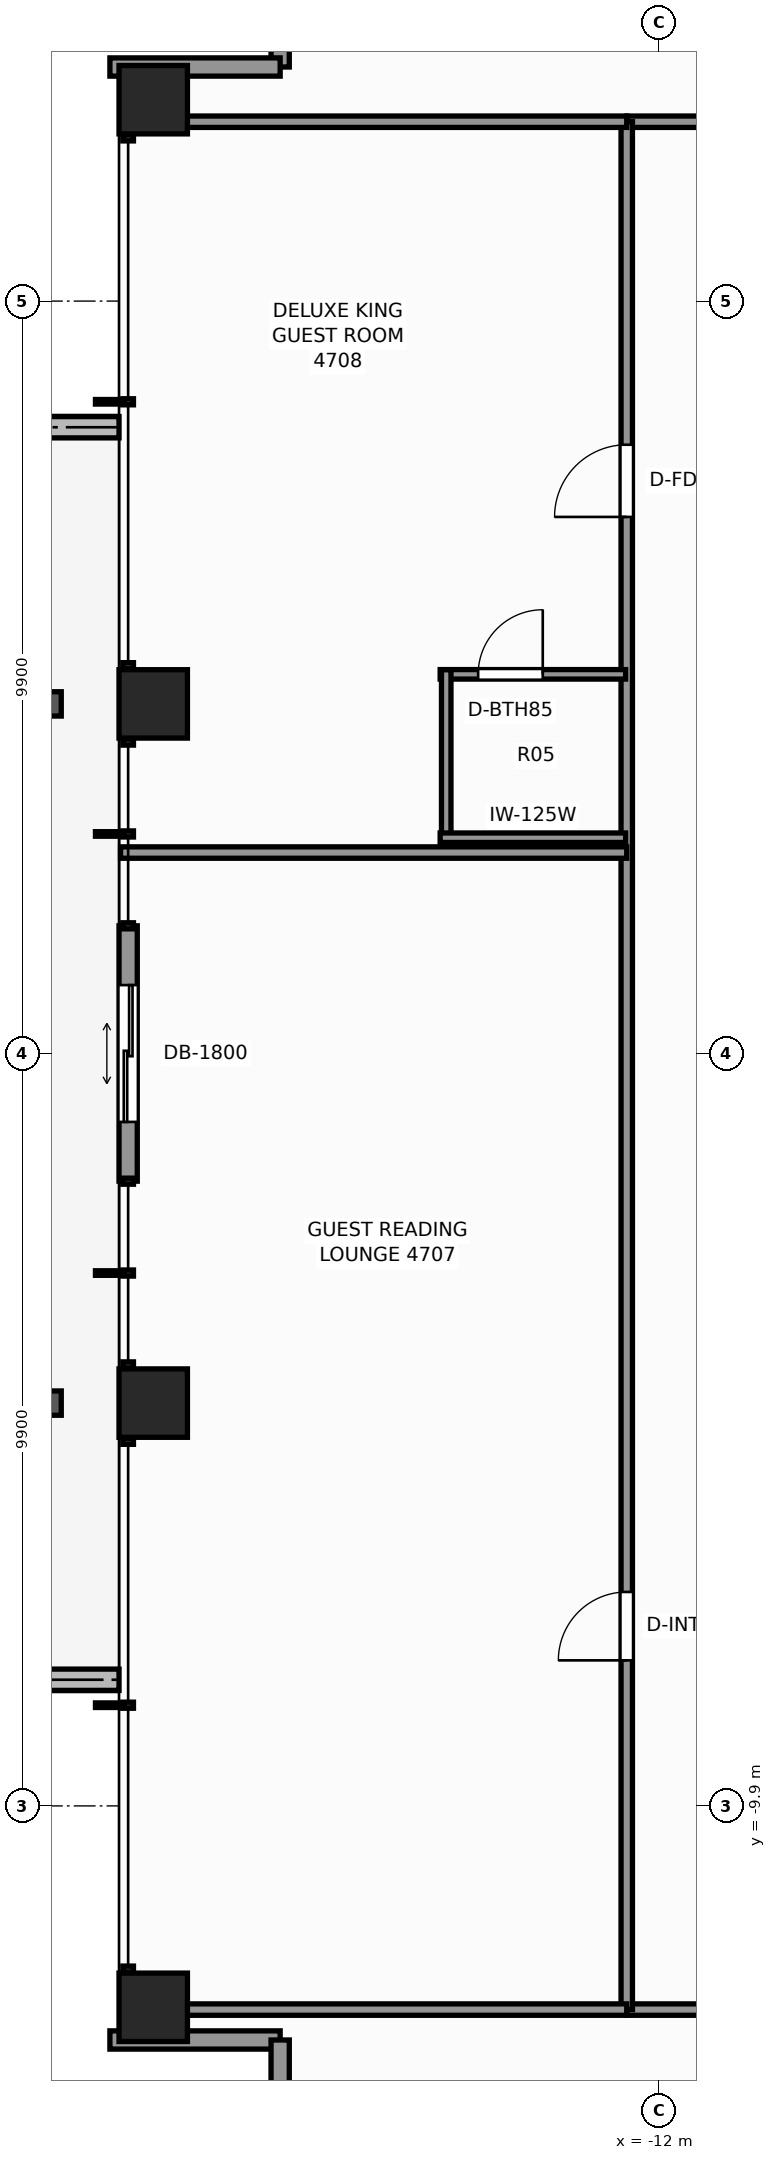
"""IFC4 building model, lengths in metres.
Left out: names, types, materials, properties, quantities, classifications, styles, units other than length and angle.
Written with IfcOpenShell. Run it as: python <this file> out.ifc"""

import sys

from ifc_helpers import new_model, si_unit, direction, frame, frame_2d, origin, origin_2d, place, context, subcontext, project, spatial, rectangle, extrude, element, fill, save


model = new_model("IFC4")
c1 = context("Model", 3, precision=1e-05, world=origin(), true_north=direction((0.0, 1.0)))
c2 = subcontext(c1, "Body", "Model", "MODEL_VIEW")
j1 = project(units=[si_unit("LENGTHUNIT", "METRE"), si_unit("PLANEANGLEUNIT", "RADIAN")], contexts=[c1])
p1 = place(None, origin())
s1 = spatial("IfcSite", under=j1, at=p1, CompositionType="ELEMENT")
p2 = place(p1, origin())
s2 = spatial("IfcBuilding", under=s1, at=p2, CompositionType="ELEMENT")
p3 = place(p2, frame((0.0, 0.0, 163.5)))
s3 = spatial("IfcBuildingStorey", under=s2, at=p3, CompositionType="ELEMENT", Elevation=163.5)
for number, where, z_axis, x_axis in (
    (1, (-18.65, -12.55, 0.0), (0.0, 0.0, 1.0), (1.0, 0.0, 0.0)),
    (2, (-18.65, -4.6, 0.0), (0.0, 0.0, 1.0), (1.0, 0.0, 0.0)),
    (3, (-18.65, 4.6, 0.0), (0.0, 0.0, 1.0), (1.0, 0.0, 0.0)),
    (4, (-18.65, 12.55, 0.0), (0.0, 0.0, 1.0), (1.0, 0.0, 0.0)),
):
    element("IfcColumn", number, at=place(p3, frame(where, z_axis=z_axis, x_axis=x_axis)), inside=s3, PredefinedType="COLUMN", context=c2, shape_type="SweptSolid", body=[
        extrude(rectangle(XDim=0.9, YDim=0.9, at=origin_2d()), origin(), (0.0, 0.0, 1.0), 3.3),
    ])
p4 = place(p3, frame((-22.314, -8.24, -0.02), z_axis=(0.0, 0.0, 1.0), x_axis=(1.0, 0.0, 0.0)))
e5 = element("IfcWall", 5, at=p4, inside=s3, PredefinedType="PARAPET", context=c2, shape_type="SweptSolid", body=[
    extrude(rectangle(XDim=3.214, YDim=0.28, at=frame_2d((1.607, 0.0))), origin(), (0.0, 0.0, 1.0), 0.42),
])
p5 = place(p3, frame((-19.1, 8.24, -0.02), z_axis=(0.0, 0.0, 1.0), x_axis=(-1.0, 0.0, 0.0)))
e6 = element("IfcWall", 6, at=p5, inside=s3, PredefinedType="PARAPET", context=c2, shape_type="SweptSolid", body=[
    extrude(rectangle(XDim=2.006, YDim=0.28, at=frame_2d((1.003, 0.0))), origin(), (0.0, 0.0, 1.0), 0.42),
])
p6 = place(p3, frame((-16.98, 12.98, 0.0), z_axis=(0.0, 0.0, 1.0), x_axis=(0.0, 1.0, 0.0)))
e7 = element("IfcWall", 7, at=p6, inside=s3, PredefinedType="STANDARD", context=c2, shape_type="SweptSolid", body=[
    extrude(rectangle(XDim=2.24, YDim=0.24, at=frame_2d((1.12, 0.0))), origin(), (0.0, 0.0, 1.0), 2.483),
])
p7 = place(p6, frame((0.45, 0.0, 0.65)))
e8 = element("IfcOpeningElement", 8, at=p7, cuts=e7, PredefinedType="OPENING", context=c2, shape_type="SweptSolid", body=[
    extrude(rectangle(XDim=1.1, YDim=1.45, at=frame_2d((0.55, 0.725))), frame((0.0, 0.13, 0.0), z_axis=(0.0, -1.0, 0.0), x_axis=(1.0, 0.0, 0.0)), (0.0, 0.0, 1.0), 0.26),
])
p8 = place(p3, frame((-19.22, 12.98, 0.0), z_axis=(0.0, 0.0, 1.0), x_axis=(1.0, 0.0, 0.0)))
e9 = element("IfcWall", 9, at=p8, inside=s3, PredefinedType="STANDARD", context=c2, shape_type="SweptSolid", body=[
    extrude(rectangle(XDim=2.24, YDim=0.24, at=frame_2d((1.12, 0.0))), origin(), (0.0, 0.0, 1.0), 2.483),
])
p9 = place(p3, frame((-18.98, -1.68, 0.0), z_axis=(0.0, 0.0, 1.0), x_axis=(0.0, 1.0, 0.0)))
e10 = element("IfcWall", 10, at=p9, inside=s3, PredefinedType="STANDARD", context=c2, shape_type="SweptSolid", body=[
    extrude(rectangle(XDim=3.36, YDim=0.24, at=frame_2d((1.68, 0.0))), origin(), (0.0, 0.0, 1.0), 3.1),
])
p10 = place(p9, frame((0.78, 0.0, 0.0)))
e11 = element("IfcOpeningElement", 11, at=p10, cuts=e10, PredefinedType="OPENING", context=c2, shape_type="SweptSolid", body=[
    extrude(rectangle(XDim=1.8, YDim=2.2, at=frame_2d((0.9, 1.1))), frame((0.0, 0.13, 0.0), z_axis=(0.0, -1.0, 0.0), x_axis=(1.0, 0.0, 0.0)), (0.0, 0.0, 1.0), 0.26),
])
p11 = place(p3, frame((-16.98, -12.98, 0.0), z_axis=(0.0, 0.0, 1.0), x_axis=(-1.0, 0.0, 0.0)))
e12 = element("IfcWall", 12, at=p11, inside=s3, PredefinedType="STANDARD", context=c2, shape_type="SweptSolid", body=[
    extrude(rectangle(XDim=2.24, YDim=0.24, at=frame_2d((1.12, 0.0))), origin(), (0.0, 0.0, 1.0), 2.483),
])
p12 = place(p3, frame((-16.98, -15.22, 0.0), z_axis=(0.0, 0.0, 1.0), x_axis=(0.0, 1.0, 0.0)))
e13 = element("IfcWall", 13, at=p12, inside=s3, PredefinedType="STANDARD", context=c2, shape_type="SweptSolid", body=[
    extrude(rectangle(XDim=2.24, YDim=0.24, at=frame_2d((1.12, 0.0))), origin(), (0.0, 0.0, 1.0), 2.483),
])
p13 = place(p12, frame((0.45, 0.0, 0.65)))
e14 = element("IfcOpeningElement", 14, at=p13, cuts=e13, PredefinedType="OPENING", context=c2, shape_type="SweptSolid", body=[
    extrude(rectangle(XDim=1.1, YDim=1.45, at=frame_2d((0.55, 0.725))), frame((0.0, 0.13, 0.0), z_axis=(0.0, -1.0, 0.0), x_axis=(1.0, 0.0, 0.0)), (0.0, 0.0, 1.0), 0.26),
])
p14 = place(p3, frame((-12.42, -12.58, 0.0), z_axis=(0.0, 0.0, 1.0), x_axis=(1.0, 0.0, 0.0)))
e15 = element("IfcWall", 15, at=p14, inside=s3, PredefinedType="PARTITIONING", context=c2, shape_type="SweptSolid", body=[
    extrude(rectangle(XDim=24.84, YDim=0.15, at=frame_2d((12.42, 0.0))), origin(), (0.0, 0.0, 1.0), 2.389),
])
p15 = place(p14, frame((4.435, 0.0, 0.0)))
e16 = element("IfcOpeningElement", 16, at=p15, cuts=e15, PredefinedType="OPENING", context=c2, shape_type="SweptSolid", body=[
    extrude(rectangle(XDim=0.9, YDim=2.06, at=frame_2d((0.45, 1.03))), frame((0.0, 0.085, 0.0), z_axis=(0.0, -1.0, 0.0), x_axis=(1.0, 0.0, 0.0)), (0.0, 0.0, 1.0), 0.17),
])
p16 = place(p14, frame((19.505, 0.0, 0.0)))
e17 = element("IfcOpeningElement", 17, at=p16, cuts=e15, PredefinedType="OPENING", context=c2, shape_type="SweptSolid", body=[
    extrude(rectangle(XDim=0.9, YDim=2.06, at=frame_2d((0.45, 1.03))), frame((0.0, 0.085, 0.0), z_axis=(0.0, -1.0, 0.0), x_axis=(1.0, 0.0, 0.0)), (0.0, 0.0, 1.0), 0.17),
])
p17 = place(p3, frame((-12.42, 12.26, 0.0), z_axis=(0.0, 0.0, 1.0), x_axis=(1.0, 0.0, 0.0)))
e18 = element("IfcWall", 18, at=p17, inside=s3, PredefinedType="PARTITIONING", context=c2, shape_type="SweptSolid", body=[
    extrude(rectangle(XDim=24.84, YDim=0.15, at=frame_2d((12.42, 0.0))), origin(), (0.0, 0.0, 1.0), 2.389),
])
p18 = place(p17, frame((3.541, 0.0, 0.0)))
e19 = element("IfcOpeningElement", 19, at=p18, cuts=e18, PredefinedType="OPENING", context=c2, shape_type="SweptSolid", body=[
    extrude(rectangle(XDim=0.95, YDim=2.06, at=frame_2d((0.475, 1.03))), frame((0.0, 0.085, 0.0), z_axis=(0.0, -1.0, 0.0), x_axis=(1.0, 0.0, 0.0)), (0.0, 0.0, 1.0), 0.17),
])
p19 = place(p17, frame((13.975, 0.0, 0.0)))
e20 = element("IfcOpeningElement", 20, at=p19, cuts=e18, PredefinedType="OPENING", context=c2, shape_type="SweptSolid", body=[
    extrude(rectangle(XDim=0.95, YDim=2.06, at=frame_2d((0.475, 1.03))), frame((0.0, 0.085, 0.0), z_axis=(0.0, -1.0, 0.0), x_axis=(1.0, 0.0, 0.0)), (0.0, 0.0, 1.0), 0.17),
])
p20 = place(p17, frame((20.05, 0.0, 0.0)))
e21 = element("IfcOpeningElement", 21, at=p20, cuts=e18, PredefinedType="OPENING", context=c2, shape_type="SweptSolid", body=[
    extrude(rectangle(XDim=0.95, YDim=2.06, at=frame_2d((0.475, 1.03))), frame((0.0, 0.085, 0.0), z_axis=(0.0, -1.0, 0.0), x_axis=(1.0, 0.0, 0.0)), (0.0, 0.0, 1.0), 0.17),
])
p21 = place(p3, frame((-12.42, -12.58, 0.0), z_axis=(0.0, 0.0, 1.0), x_axis=(0.0, 1.0, 0.0)))
e22 = element("IfcWall", 22, at=p21, inside=s3, PredefinedType="PARTITIONING", context=c2, shape_type="SweptSolid", body=[
    extrude(rectangle(XDim=24.84, YDim=0.15, at=frame_2d((12.42, 0.0))), origin(), (0.0, 0.0, 1.0), 2.389),
])
p22 = place(p21, frame((4.595, 0.0, 0.0)))
e23 = element("IfcOpeningElement", 23, at=p22, cuts=e22, PredefinedType="OPENING", context=c2, shape_type="SweptSolid", body=[
    extrude(rectangle(XDim=0.9, YDim=2.06, at=frame_2d((0.45, 1.03))), frame((0.0, 0.085, 0.0), z_axis=(0.0, -1.0, 0.0), x_axis=(1.0, 0.0, 0.0)), (0.0, 0.0, 1.0), 0.17),
])
p23 = place(p21, frame((19.64, 0.0, 0.0)))
e24 = element("IfcOpeningElement", 24, at=p23, cuts=e22, PredefinedType="OPENING", context=c2, shape_type="SweptSolid", body=[
    extrude(rectangle(XDim=0.95, YDim=2.06, at=frame_2d((0.475, 1.03))), frame((0.0, 0.085, 0.0), z_axis=(0.0, -1.0, 0.0), x_axis=(1.0, 0.0, 0.0)), (0.0, 0.0, 1.0), 0.17),
])
for number, where, z_axis, x_axis in (
    (25, (-19.08, -12.58, 0.0), (0.0, 0.0, 1.0), (1.0, 0.0, 0.0)),
    (26, (-19.08, 12.26, 0.0), (0.0, 0.0, 1.0), (1.0, 0.0, 0.0)),
):
    element("IfcWall", number, at=place(p3, frame(where, z_axis=z_axis, x_axis=x_axis)), inside=s3, PredefinedType="PARTITIONING", context=c2, shape_type="SweptSolid", body=[
        extrude(rectangle(XDim=6.66, YDim=0.15, at=frame_2d((3.33, 0.0))), origin(), (0.0, 0.0, 1.0), 2.389),
    ])
p24 = place(p3, frame((-19.08, 2.644, 0.0), z_axis=(0.0, 0.0, 1.0), x_axis=(1.0, 0.0, 0.0)))
e27 = element("IfcWall", 27, at=p24, inside=s3, PredefinedType="PARTITIONING", context=c2, shape_type="SweptSolid", body=[
    extrude(rectangle(XDim=6.66, YDim=0.15, at=frame_2d((3.33, 0.0))), origin(), (0.0, 0.0, 1.0), 2.473),
])
p25 = place(p3, frame((-14.875, 4.989, 0.0), z_axis=(0.0, 0.0, 1.0), x_axis=(1.0, 0.0, 0.0)))
e28 = element("IfcWall", 28, at=p25, inside=s3, PredefinedType="PARTITIONING", context=c2, shape_type="SweptSolid", body=[
    extrude(rectangle(XDim=2.44, YDim=0.125, at=frame_2d((1.22, 0.0))), origin(), (0.0, 0.0, 1.0), 3.1),
])
p26 = place(p25, frame((0.5, 0.0, 0.0)))
e29 = element("IfcOpeningElement", 29, at=p26, cuts=e28, PredefinedType="OPENING", context=c2, shape_type="SweptSolid", body=[
    extrude(rectangle(XDim=0.85, YDim=2.03, at=frame_2d((0.425, 1.015))), frame((0.0, 0.073, 0.0), z_axis=(0.0, -1.0, 0.0), x_axis=(1.0, 0.0, 0.0)), (0.0, 0.0, 1.0), 0.145),
])
p27 = place(p3, frame((-14.795, 2.779, 0.0), z_axis=(0.0, 0.0, 1.0), x_axis=(0.0, 1.0, 0.0)))
e30 = element("IfcWall", 30, at=p27, inside=s3, PredefinedType="PARTITIONING", context=c2, shape_type="SweptSolid", body=[
    extrude(rectangle(XDim=2.27, YDim=0.125, at=frame_2d((1.135, 0.0))), origin(), (0.0, 0.0, 1.0), 2.389),
])
p28 = place(p3, frame((-14.875, 2.839, 0.0), z_axis=(0.0, 0.0, 1.0), x_axis=(1.0, 0.0, 0.0)))
e31 = element("IfcWall", 31, at=p28, inside=s3, PredefinedType="PARTITIONING", context=c2, shape_type="SweptSolid", body=[
    extrude(rectangle(XDim=2.44, YDim=0.125, at=frame_2d((1.22, 0.0))), origin(), (0.0, 0.0, 1.0), 3.1),
])
p29 = place(p10, origin())
e32 = element("IfcDoor", 32, at=p29, inside=s3, OperationType="DOUBLE_DOOR_SLIDING", PredefinedType="DOOR", context=c2, shape_type="SweptSolid", body=[
    extrude(rectangle(XDim=1.8, YDim=2.2, at=frame_2d((0.9, 1.1))), frame((0.0, 0.025, 0.0), z_axis=(0.0, -1.0, 0.0), x_axis=(1.0, 0.0, 0.0)), (0.0, 0.0, 1.0), 0.05),
])
fill(e11, e32)
p30 = place(p22, origin())
e33 = element("IfcDoor", 33, at=p30, inside=s3, OperationType="SINGLE_SWING_LEFT", PredefinedType="DOOR", context=c2, shape_type="SweptSolid", body=[
    extrude(rectangle(XDim=0.9, YDim=2.06, at=frame_2d((0.45, 1.03))), frame((0.0, 0.025, 0.0), z_axis=(0.0, -1.0, 0.0), x_axis=(1.0, 0.0, 0.0)), (0.0, 0.0, 1.0), 0.05),
])
fill(e23, e33)
p31 = place(p26, origin())
e34 = element("IfcDoor", 34, at=p31, inside=s3, OperationType="SINGLE_SWING_RIGHT", PredefinedType="DOOR", context=c2, shape_type="SweptSolid", body=[
    extrude(rectangle(XDim=0.85, YDim=2.03, at=frame_2d((0.425, 1.015))), frame((0.0, 0.025, 0.0), z_axis=(0.0, -1.0, 0.0), x_axis=(1.0, 0.0, 0.0)), (0.0, 0.0, 1.0), 0.05),
])
fill(e29, e34)
p32 = place(p23, origin())
e35 = element("IfcDoor", 35, at=p32, inside=s3, OperationType="SINGLE_SWING_LEFT", PredefinedType="DOOR", context=c2, shape_type="SweptSolid", body=[
    extrude(rectangle(XDim=0.95, YDim=2.06, at=frame_2d((0.475, 1.03))), frame((0.0, 0.025, 0.0), z_axis=(0.0, -1.0, 0.0), x_axis=(1.0, 0.0, 0.0)), (0.0, 0.0, 1.0), 0.05),
])
fill(e24, e35)
save(model, sys.argv[1])
